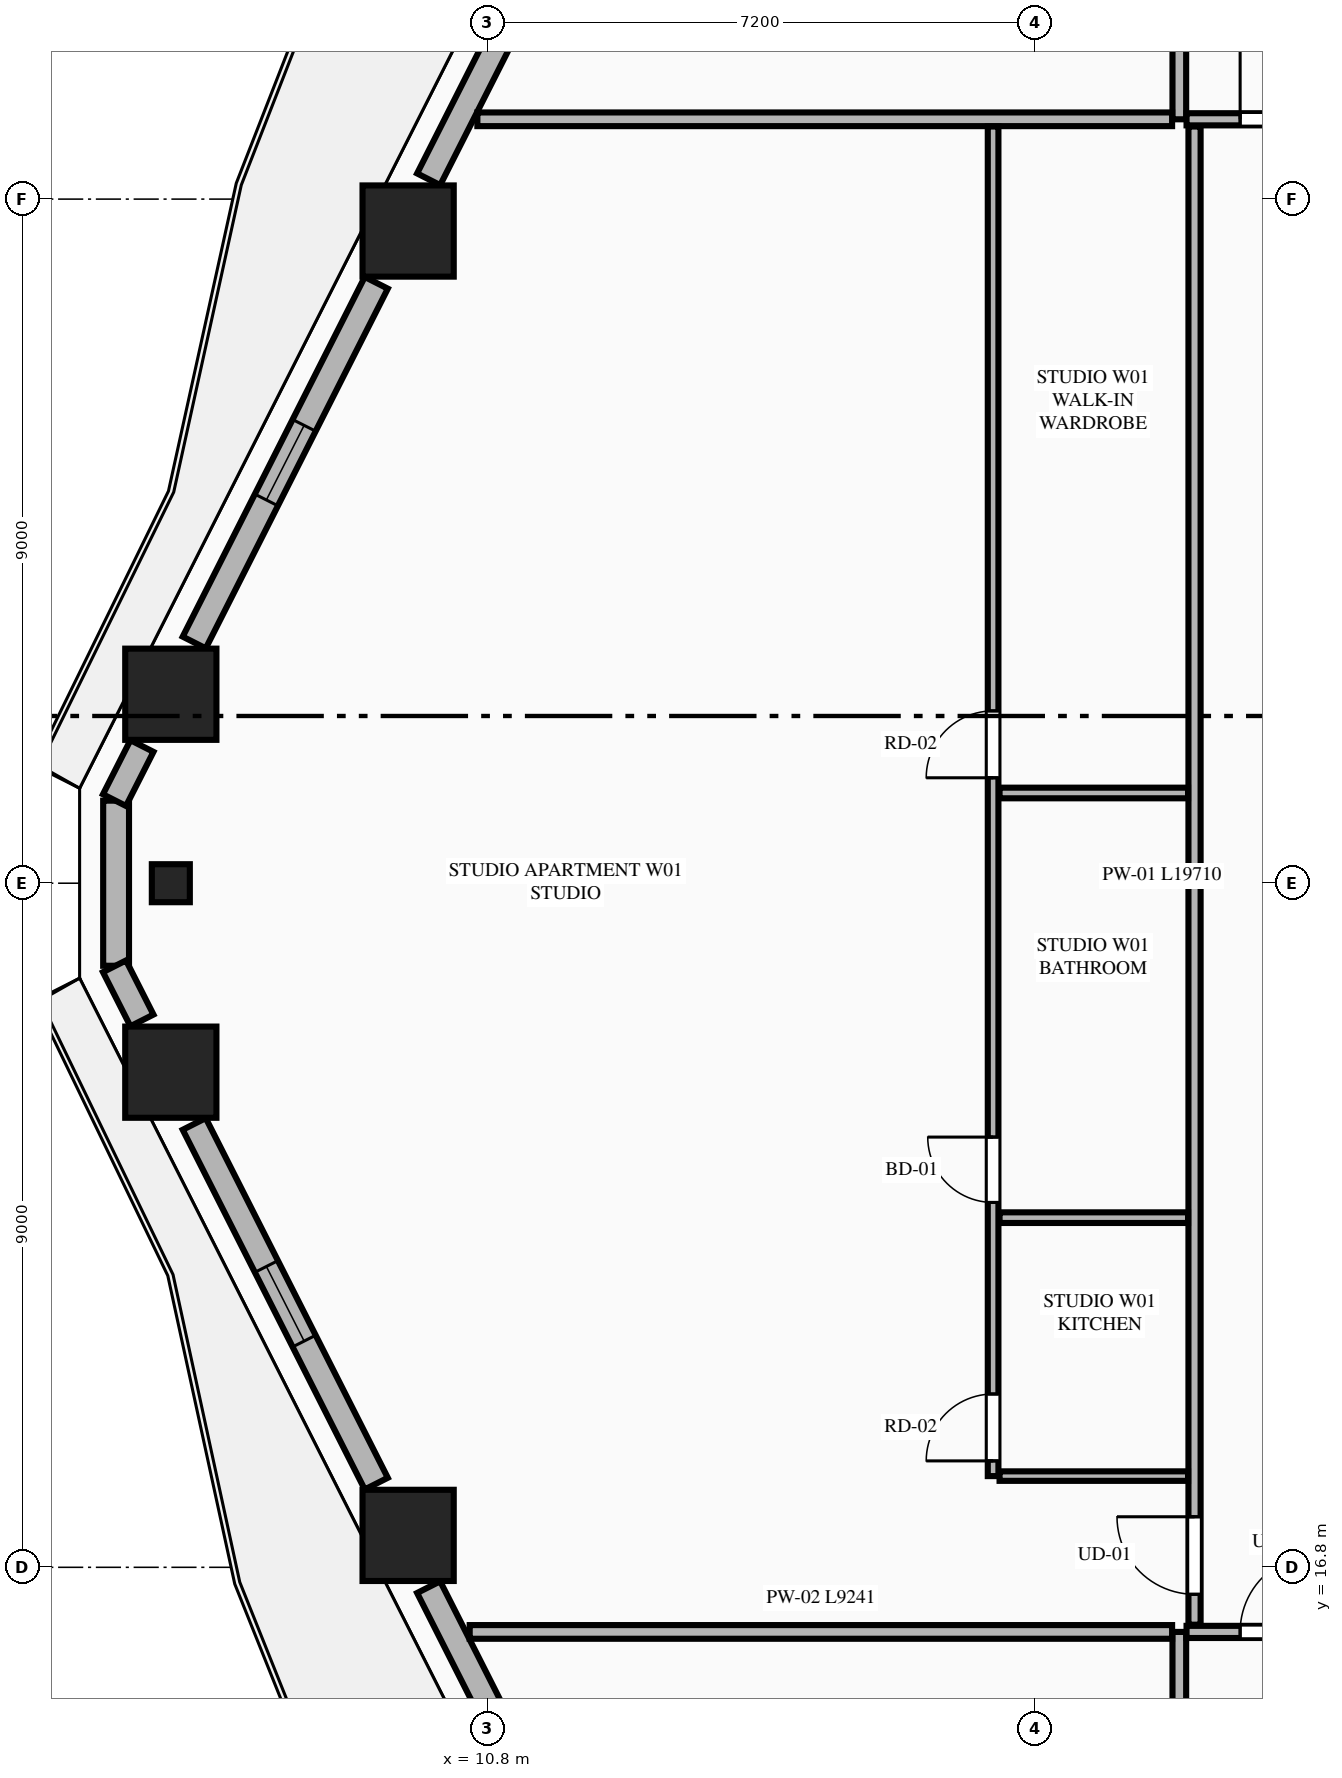
"""IFC4 building model, lengths in metres.
Left out: names, types, materials, properties, quantities, classifications, styles, units other than length and angle.
Written with IfcOpenShell. Run it as: python <this file> out.ifc"""

import sys

from ifc_helpers import new_model, si_unit, direction, frame, frame_2d, origin, origin_2d, place, context, subcontext, project, spatial, rectangle, extrude, element, fill, save


model = new_model("IFC4")
c1 = context("Model", 3, precision=1e-05, world=origin(), true_north=direction((0.0, 1.0)))
c2 = subcontext(c1, "Body", "Model", "MODEL_VIEW")
j1 = project(units=[si_unit("LENGTHUNIT", "METRE"), si_unit("PLANEANGLEUNIT", "RADIAN")], contexts=[c1])
p1 = place(None, origin())
s1 = spatial("IfcSite", under=j1, at=p1, CompositionType="ELEMENT")
p2 = place(p1, origin())
s2 = spatial("IfcBuilding", under=s1, at=p2, CompositionType="ELEMENT")
p3 = place(p2, frame((0.0, 0.0, 60.4)))
s3 = spatial("IfcBuildingStorey", under=s2, at=p3, CompositionType="ELEMENT", Elevation=60.4)
for number, where, z_axis, x_axis in (
    (1, (9.754, 34.38, 0.0), (0.0, 0.0, 1.0), (1.0, 0.0, 0.0)),
    (2, (6.632, 28.286, 0.0), (0.0, 0.0, 1.0), (1.0, 0.0, 0.0)),
    (3, (6.632, 23.314, 0.0), (0.0, 0.0, 1.0), (1.0, 0.0, 0.0)),
    (4, (9.754, 17.22, 0.0), (0.0, 0.0, 1.0), (1.0, 0.0, 0.0)),
):
    element("IfcColumn", number, at=place(p3, frame(where, z_axis=z_axis, x_axis=x_axis)), inside=s3, PredefinedType="COLUMN", context=c2, shape_type="SweptSolid", body=[
        extrude(rectangle(XDim=1.2, YDim=1.2, at=origin_2d()), origin(), (0.0, 0.0, 1.0), 3.55),
    ])
p4 = place(p3, frame((6.632, 25.8, 0.0), z_axis=(0.0, 0.0, 1.0), x_axis=(0.0, -1.0, 0.0)))
e5 = element("IfcColumn", 5, at=p4, inside=s3, PredefinedType="PILASTER", context=c2, shape_type="SweptSolid", body=[
    extrude(rectangle(XDim=0.5, YDim=0.35, at=origin_2d()), origin(), (0.0, 0.0, 1.0), 3.55),
])
p5 = place(p3, frame((5.912, 26.886, 0.0), z_axis=(0.0, 0.0, 1.0), x_axis=(0.0, -1.0, 0.0)))
e6 = element("IfcWall", 6, at=p5, inside=s3, PredefinedType="STANDARD", context=c2, shape_type="SweptSolid", body=[
    extrude(rectangle(XDim=2.172, YDim=0.34, at=frame_2d((1.086, 0.0))), origin(), (0.0, 0.0, 1.0), 3.33),
])
p6 = place(p3, frame((12.529, 40.01, 0.0), z_axis=(0.0, 0.0, 1.0), x_axis=(-0.451627137896, -0.892206774417, 0.0)))
e7 = element("IfcWall", 7, at=p6, inside=s3, PredefinedType="STANDARD", context=c2, shape_type="SweptSolid", body=[
    extrude(rectangle(XDim=5.547, YDim=0.34, at=frame_2d((2.773, 0.0))), origin(), (0.0, 0.0, 1.0), 2.787),
])
p7 = place(p6, frame((1.656, 0.0, 0.0)))
e8 = element("IfcOpeningElement", 8, at=p7, cuts=e7, PredefinedType="OPENING", context=c2, shape_type="SweptSolid", body=[
    extrude(rectangle(XDim=1.1, YDim=2.25, at=frame_2d((0.55, 1.125))), frame((0.0, 0.18, 0.0), z_axis=(0.0, -1.0, 0.0), x_axis=(1.0, 0.0, 0.0)), (0.0, 0.0, 1.0), 0.36),
])
p8 = place(p3, frame((9.335, 33.699, 0.0), z_axis=(0.0, 0.0, 1.0), x_axis=(-0.451590635984, -0.892225250422, 0.0)))
e9 = element("IfcWall", 9, at=p8, inside=s3, PredefinedType="STANDARD", context=c2, shape_type="SweptSolid", body=[
    extrude(rectangle(XDim=5.303, YDim=0.34, at=frame_2d((2.652, 0.0))), origin(), (0.0, 0.0, 1.0), 2.787),
])
p9 = place(p8, frame((2.102, 0.0, 0.75)))
e10 = element("IfcOpeningElement", 10, at=p9, cuts=e9, PredefinedType="OPENING", context=c2, shape_type="SweptSolid", body=[
    extrude(rectangle(XDim=1.1, YDim=1.887, at=frame_2d((0.55, 0.943))), frame((0.0, 0.18, 0.0), z_axis=(0.0, -1.0, 0.0), x_axis=(1.0, 0.0, 0.0)), (0.0, 0.0, 1.0), 0.36),
])
for number, where, z_axis, x_axis in (
    (11, (6.252, 27.605, 0.0), (0.0, 0.0, 1.0), (-0.452, -0.892, 0.0)),
    (12, (5.891, 24.707, 0.0), (0.0, 0.0, 1.0), (0.452, -0.892, 0.0)),
):
    element("IfcWall", number, at=place(p3, frame(where, z_axis=z_axis, x_axis=x_axis)), inside=s3, PredefinedType="STANDARD", context=c2, shape_type="SweptSolid", body=[
        extrude(rectangle(XDim=0.798, YDim=0.34, at=frame_2d((0.399, 0.0))), origin(), (0.0, 0.0, 1.0), 3.33),
    ])
p10 = place(p3, frame((6.94, 22.633, 0.0), z_axis=(0.0, 0.0, 1.0), x_axis=(0.451572088722, -0.892234637686, 0.0)))
e13 = element("IfcWall", 13, at=p10, inside=s3, PredefinedType="STANDARD", context=c2, shape_type="SweptSolid", body=[
    extrude(rectangle(XDim=5.304, YDim=0.34, at=frame_2d((2.652, 0.0))), origin(), (0.0, 0.0, 1.0), 2.787),
])
p11 = place(p10, frame((2.102, 0.0, 0.75)))
e14 = element("IfcOpeningElement", 14, at=p11, cuts=e13, PredefinedType="OPENING", context=c2, shape_type="SweptSolid", body=[
    extrude(rectangle(XDim=1.1, YDim=1.887, at=frame_2d((0.55, 0.943))), frame((0.0, 0.18, 0.0), z_axis=(0.0, -1.0, 0.0), x_axis=(1.0, 0.0, 0.0)), (0.0, 0.0, 1.0), 0.36),
])
p12 = place(p3, frame((10.024, 16.539, 0.0), z_axis=(0.0, 0.0, 1.0), x_axis=(0.451627137896, -0.892206774417, 0.0)))
e15 = element("IfcWall", 15, at=p12, inside=s3, PredefinedType="STANDARD", context=c2, shape_type="SweptSolid", body=[
    extrude(rectangle(XDim=5.547, YDim=0.34, at=frame_2d((2.773, 0.0))), origin(), (0.0, 0.0, 1.0), 2.787),
])
p13 = place(p12, frame((2.679, 0.0, 0.0)))
e16 = element("IfcOpeningElement", 16, at=p13, cuts=e15, PredefinedType="OPENING", context=c2, shape_type="SweptSolid", body=[
    extrude(rectangle(XDim=1.1, YDim=2.25, at=frame_2d((0.55, 1.125))), frame((0.0, 0.18, 0.0), z_axis=(0.0, -1.0, 0.0), x_axis=(1.0, 0.0, 0.0)), (0.0, 0.0, 1.0), 0.36),
])
p14 = place(p3, frame((19.9, 2.455, 0.0), z_axis=(0.0, 0.0, 1.0), x_axis=(0.0, 1.0, 0.0)))
e17 = element("IfcWall", 17, at=p14, inside=s3, PredefinedType="PARTITIONING", context=c2, shape_type="SweptSolid", body=[
    extrude(rectangle(XDim=13.495, YDim=0.18, at=frame_2d((6.748, 0.0))), origin(), (0.0, 0.0, 1.0), 3.33),
])
p15 = place(p3, frame((19.995, 15.95, 0.0), z_axis=(0.0, 0.0, 1.0), x_axis=(1.0, 0.0, 0.0)))
e18 = element("IfcWall", 18, at=p15, inside=s3, PredefinedType="PARTITIONING", context=c2, shape_type="SweptSolid", body=[
    extrude(rectangle(XDim=8.188, YDim=0.16, at=frame_2d((4.094, 0.0))), origin(), (0.0, 0.0, 1.0), 3.33),
])
p16 = place(p15, frame((0.705, 0.0, 0.0)))
e19 = element("IfcOpeningElement", 19, at=p16, cuts=e18, PredefinedType="OPENING", context=c2, shape_type="SweptSolid", body=[
    extrude(rectangle(XDim=1.02, YDim=2.25, at=frame_2d((0.51, 1.125))), frame((0.0, 0.09, 0.0), z_axis=(0.0, -1.0, 0.0), x_axis=(1.0, 0.0, 0.0)), (0.0, 0.0, 1.0), 0.18),
])
p17 = place(p3, frame((19.9, 35.85, 0.0), z_axis=(0.0, 0.0, 1.0), x_axis=(0.0, 1.0, 0.0)))
e20 = element("IfcWall", 20, at=p17, inside=s3, PredefinedType="PARTITIONING", context=c2, shape_type="SweptSolid", body=[
    extrude(rectangle(XDim=13.295, YDim=0.18, at=frame_2d((6.647, 0.0))), origin(), (0.0, 0.0, 1.0), 3.33),
])
p18 = place(p3, frame((19.995, 35.85, 0.0), z_axis=(0.0, 0.0, 1.0), x_axis=(1.0, 0.0, 0.0)))
e21 = element("IfcWall", 21, at=p18, inside=s3, PredefinedType="PARTITIONING", context=c2, shape_type="SweptSolid", body=[
    extrude(rectangle(XDim=8.188, YDim=0.16, at=frame_2d((4.094, 0.0))), origin(), (0.0, 0.0, 1.0), 3.33),
])
p19 = place(p18, frame((0.705, 0.0, 0.0)))
e22 = element("IfcOpeningElement", 22, at=p19, cuts=e21, PredefinedType="OPENING", context=c2, shape_type="SweptSolid", body=[
    extrude(rectangle(XDim=1.02, YDim=2.25, at=frame_2d((0.51, 1.125))), frame((0.0, 0.09, 0.0), z_axis=(0.0, -1.0, 0.0), x_axis=(1.0, 0.0, 0.0)), (0.0, 0.0, 1.0), 0.18),
])
p20 = place(p3, frame((10.564, 15.95, 0.0), z_axis=(0.0, 0.0, 1.0), x_axis=(1.0, 0.0, 0.0)))
e23 = element("IfcWall", 23, at=p20, inside=s3, PredefinedType="PARTITIONING", context=c2, shape_type="SweptSolid", body=[
    extrude(rectangle(XDim=9.241, YDim=0.18, at=frame_2d((4.621, 0.0))), origin(), (0.0, 0.0, 1.0), 3.33),
])
p21 = place(p3, frame((10.665, 35.85, 0.0), z_axis=(0.0, 0.0, 1.0), x_axis=(1.0, 0.0, 0.0)))
e24 = element("IfcWall", 24, at=p21, inside=s3, PredefinedType="PARTITIONING", context=c2, shape_type="SweptSolid", body=[
    extrude(rectangle(XDim=9.14, YDim=0.18, at=frame_2d((4.57, 0.0))), origin(), (0.0, 0.0, 1.0), 3.33),
])
p22 = place(p3, frame((20.1, 16.045, 0.0), z_axis=(0.0, 0.0, 1.0), x_axis=(0.0, 1.0, 0.0)))
e25 = element("IfcWall", 25, at=p22, inside=s3, PredefinedType="PARTITIONING", context=c2, shape_type="SweptSolid", body=[
    extrude(rectangle(XDim=19.71, YDim=0.16, at=frame_2d((9.855, 0.0))), origin(), (0.0, 0.0, 1.0), 3.33),
])
p23 = place(p22, frame((0.4, 0.0, 0.0)))
e26 = element("IfcOpeningElement", 26, at=p23, cuts=e25, PredefinedType="OPENING", context=c2, shape_type="SweptSolid", body=[
    extrude(rectangle(XDim=1.02, YDim=2.25, at=frame_2d((0.51, 1.125))), frame((0.0, 0.09, 0.0), z_axis=(0.0, -1.0, 0.0), x_axis=(1.0, 0.0, 0.0)), (0.0, 0.0, 1.0), 0.18),
])
p24 = place(p3, frame((17.535, 18.0, 0.0), z_axis=(0.0, 0.0, 1.0), x_axis=(1.0, 0.0, 0.0)))
e27 = element("IfcWall", 27, at=p24, inside=s3, PredefinedType="PARTITIONING", context=c2, shape_type="SweptSolid", body=[
    extrude(rectangle(XDim=2.48, YDim=0.125, at=frame_2d((1.24, 0.0))), origin(), (0.0, 0.0, 1.0), 2.636),
])
p25 = place(p3, frame((17.45, 18.0, 0.0), z_axis=(0.0, 0.0, 1.0), x_axis=(0.0, 1.0, 0.0)))
e28 = element("IfcWall", 28, at=p25, inside=s3, PredefinedType="PLUMBINGWALL", context=c2, shape_type="SweptSolid", body=[
    extrude(rectangle(XDim=17.755, YDim=0.14, at=frame_2d((8.877, 0.0))), origin(), (0.0, 0.0, 1.0), 3.33),
])
p26 = place(p25, frame((3.6, 0.0, 0.0)))
e29 = element("IfcOpeningElement", 29, at=p26, cuts=e28, PredefinedType="OPENING", context=c2, shape_type="SweptSolid", body=[
    extrude(rectangle(XDim=0.86, YDim=2.1, at=frame_2d((0.43, 1.05))), frame((0.0, 0.08, 0.0), z_axis=(0.0, -1.0, 0.0), x_axis=(1.0, 0.0, 0.0)), (0.0, 0.0, 1.0), 0.16),
])
p27 = place(p25, frame((9.187, 0.0, 0.0)))
e30 = element("IfcOpeningElement", 30, at=p27, cuts=e28, PredefinedType="OPENING", context=c2, shape_type="SweptSolid", body=[
    extrude(rectangle(XDim=0.88, YDim=2.15, at=frame_2d((0.44, 1.075))), frame((0.0, 0.08, 0.0), z_axis=(0.0, -1.0, 0.0), x_axis=(1.0, 0.0, 0.0)), (0.0, 0.0, 1.0), 0.16),
])
p28 = place(p25, frame((0.2, 0.0, 0.0)))
e31 = element("IfcOpeningElement", 31, at=p28, cuts=e28, PredefinedType="OPENING", context=c2, shape_type="SweptSolid", body=[
    extrude(rectangle(XDim=0.88, YDim=2.15, at=frame_2d((0.44, 1.075))), frame((0.0, 0.08, 0.0), z_axis=(0.0, -1.0, 0.0), x_axis=(1.0, 0.0, 0.0)), (0.0, 0.0, 1.0), 0.16),
])
for number, where, z_axis, x_axis in (
    (32, (17.535, 21.4, 0.0), (0.0, 0.0, 1.0), (1.0, 0.0, 0.0)),
    (33, (17.535, 26.987, 0.0), (0.0, 0.0, 1.0), (1.0, 0.0, 0.0)),
):
    element("IfcWall", number, at=place(p3, frame(where, z_axis=z_axis, x_axis=x_axis)), inside=s3, PredefinedType="PLUMBINGWALL", context=c2, shape_type="SweptSolid", body=[
        extrude(rectangle(XDim=2.48, YDim=0.14, at=frame_2d((1.24, 0.0))), origin(), (0.0, 0.0, 1.0), 3.33),
    ])
p29 = place(p9, origin())
e34 = element("IfcWindow", 34, at=p29, inside=s3, PartitioningType="SINGLE_PANEL", PredefinedType="WINDOW", context=c2, shape_type="SweptSolid", body=[
    extrude(rectangle(XDim=1.1, YDim=1.887, at=frame_2d((0.55, 0.943))), frame((0.0, 0.03, 0.0), z_axis=(0.0, -1.0, 0.0), x_axis=(1.0, 0.0, 0.0)), (0.0, 0.0, 1.0), 0.06),
])
fill(e10, e34)
p30 = place(p11, origin())
e35 = element("IfcWindow", 35, at=p30, inside=s3, PartitioningType="SINGLE_PANEL", PredefinedType="WINDOW", context=c2, shape_type="SweptSolid", body=[
    extrude(rectangle(XDim=1.1, YDim=1.887, at=frame_2d((0.55, 0.943))), frame((0.0, 0.03, 0.0), z_axis=(0.0, -1.0, 0.0), x_axis=(1.0, 0.0, 0.0)), (0.0, 0.0, 1.0), 0.06),
])
fill(e14, e35)
p31 = place(p16, origin())
e36 = element("IfcDoor", 36, at=p31, inside=s3, OperationType="SINGLE_SWING_RIGHT", PredefinedType="DOOR", context=c2, shape_type="SweptSolid", body=[
    extrude(rectangle(XDim=1.02, YDim=2.25, at=frame_2d((0.51, 1.125))), frame((0.0, 0.025, 0.0), z_axis=(0.0, -1.0, 0.0), x_axis=(1.0, 0.0, 0.0)), (0.0, 0.0, 1.0), 0.05),
])
fill(e19, e36)
p32 = place(p19, origin())
e37 = element("IfcDoor", 37, at=p32, inside=s3, OperationType="SINGLE_SWING_LEFT", PredefinedType="DOOR", context=c2, shape_type="SweptSolid", body=[
    extrude(rectangle(XDim=1.02, YDim=2.25, at=frame_2d((0.51, 1.125))), frame((0.0, 0.025, 0.0), z_axis=(0.0, -1.0, 0.0), x_axis=(1.0, 0.0, 0.0)), (0.0, 0.0, 1.0), 0.05),
])
fill(e22, e37)
p33 = place(p26, origin())
e38 = element("IfcDoor", 38, at=p33, inside=s3, OperationType="SINGLE_SWING_RIGHT", PredefinedType="DOOR", context=c2, shape_type="SweptSolid", body=[
    extrude(rectangle(XDim=0.86, YDim=2.1, at=frame_2d((0.43, 1.05))), frame((0.0, 0.025, 0.0), z_axis=(0.0, -1.0, 0.0), x_axis=(1.0, 0.0, 0.0)), (0.0, 0.0, 1.0), 0.05),
])
fill(e29, e38)
p34 = place(p27, origin())
e39 = element("IfcDoor", 39, at=p34, inside=s3, OperationType="SINGLE_SWING_LEFT", PredefinedType="DOOR", context=c2, shape_type="SweptSolid", body=[
    extrude(rectangle(XDim=0.88, YDim=2.15, at=frame_2d((0.44, 1.075))), frame((0.0, 0.025, 0.0), z_axis=(0.0, -1.0, 0.0), x_axis=(1.0, 0.0, 0.0)), (0.0, 0.0, 1.0), 0.05),
])
fill(e30, e39)
p35 = place(p23, origin())
e40 = element("IfcDoor", 40, at=p35, inside=s3, OperationType="SINGLE_SWING_RIGHT", PredefinedType="DOOR", context=c2, shape_type="SweptSolid", body=[
    extrude(rectangle(XDim=1.02, YDim=2.25, at=frame_2d((0.51, 1.125))), frame((0.0, 0.025, 0.0), z_axis=(0.0, -1.0, 0.0), x_axis=(1.0, 0.0, 0.0)), (0.0, 0.0, 1.0), 0.05),
])
fill(e26, e40)
p36 = place(p28, origin())
e41 = element("IfcDoor", 41, at=p36, inside=s3, OperationType="SINGLE_SWING_LEFT", PredefinedType="DOOR", context=c2, shape_type="SweptSolid", body=[
    extrude(rectangle(XDim=0.88, YDim=2.15, at=frame_2d((0.44, 1.075))), frame((0.0, 0.025, 0.0), z_axis=(0.0, -1.0, 0.0), x_axis=(1.0, 0.0, 0.0)), (0.0, 0.0, 1.0), 0.05),
])
fill(e31, e41)
save(model, sys.argv[1])
